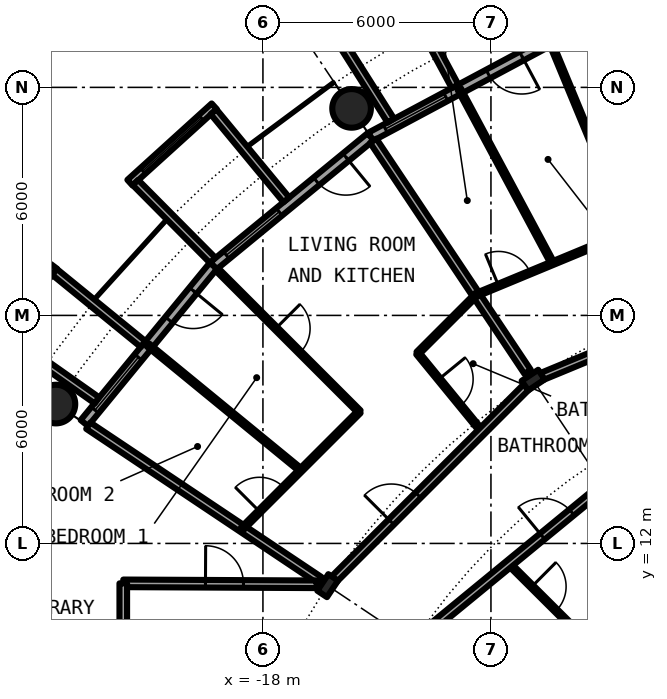
"""IFC4 building model, lengths in metres.
Left out: names, types, materials, properties, quantities, classifications, styles, units other than length and angle.
Written with IfcOpenShell. Run it as: python <this file> out.ifc"""

import sys

from ifc_helpers import new_model, si_unit, direction, frame, frame_2d, origin, origin_2d, place, context, subcontext, project, spatial, rectangle, circle, hollow_circle, i_section, extrude, element, fill, save


model = new_model("IFC4")
c1 = context("Model", 3, precision=1e-05, world=origin(), true_north=direction((0.0, 1.0)))
c2 = subcontext(c1, "Body", "Model", "MODEL_VIEW")
j1 = project(units=[si_unit("LENGTHUNIT", "METRE"), si_unit("PLANEANGLEUNIT", "RADIAN")], contexts=[c1])
p1 = place(None, origin())
s1 = spatial("IfcSite", under=j1, at=p1, CompositionType="ELEMENT")
p2 = place(p1, origin())
s2 = spatial("IfcBuilding", under=s1, at=p2, CompositionType="ELEMENT")
p3 = place(p2, frame((0.0, 0.0, 69.7)))
s3 = spatial("IfcBuildingStorey", under=s2, at=p3, CompositionType="ELEMENT", Elevation=69.7)
for number, where, z_axis, x_axis in (
    (1, (-15.667, 23.448, 0.0), (0.0, 0.0, 1.0), (1.0, 0.0, 0.0)),
    (2, (-23.448, 15.667, 0.0), (0.0, 0.0, 1.0), (1.0, 0.0, 0.0)),
):
    element("IfcColumn", number, at=place(p3, frame(where, z_axis=z_axis, x_axis=x_axis)), inside=s3, PredefinedType="COLUMN", context=c2, shape_type="SweptSolid", body=[
        extrude(hollow_circle(Radius=0.508, WallThickness=0.04, at=origin_2d()), origin(), (0.0, 0.0, 1.0), 3.05),
    ])
for number, where, z_axis, x_axis in (
    (3, (-10.889, 16.297, 0.0), (0.0, 0.0, 1.0), (-0.556, 0.831, 0.0)),
    (4, (-16.297, 10.889, 0.0), (0.0, 0.0, 1.0), (-0.831, 0.556, 0.0)),
):
    element("IfcColumn", number, at=place(p3, frame(where, z_axis=z_axis, x_axis=x_axis)), inside=s3, PredefinedType="COLUMN", context=c2, shape_type="SweptSolid", body=[
        extrude(i_section(OverallWidth=0.306, OverallDepth=0.524, WebThickness=0.021, FlangeThickness=0.04, FilletRadius=0.027, at=origin_2d()), origin(), (0.0, 0.0, 1.0), 3.05),
    ])
p4 = place(p3, frame((-10.447, 25.222, 0.0), z_axis=(0.0, 0.0, 1.0), x_axis=(-0.881915646801, -0.471407246368, 0.0)))
e5 = element("IfcWall", 5, at=p4, inside=s3, PredefinedType="SOLIDWALL", context=c2, shape_type="SweptSolid", body=[
    extrude(rectangle(XDim=5.352, YDim=0.25, at=frame_2d((2.676, 0.0))), origin(), (0.0, 0.0, 1.0), 2.7),
])
p5 = place(p4, frame((0.841, 0.0, 0.0)))
e6 = element("IfcOpeningElement", 6, at=p5, cuts=e5, PredefinedType="OPENING", context=c2, shape_type="SweptSolid", body=[
    extrude(rectangle(XDim=1.0, YDim=2.2, at=frame_2d((0.5, 1.1))), frame((0.0, 0.135, 0.0), z_axis=(0.0, -1.0, 0.0), x_axis=(1.0, 0.0, 0.0)), (0.0, 0.0, 1.0), 0.27),
])
p6 = place(p4, frame((3.111, 0.0, 0.3)))
e7 = element("IfcOpeningElement", 7, at=p6, cuts=e5, PredefinedType="OPENING", context=c2, shape_type="SweptSolid", body=[
    extrude(rectangle(XDim=1.8, YDim=2.1, at=frame_2d((0.9, 1.05))), frame((0.0, 0.135, 0.0), z_axis=(0.0, -1.0, 0.0), x_axis=(1.0, 0.0, 0.0)), (0.0, 0.0, 1.0), 0.27),
])
p7 = place(p3, frame((-12.945, 24.029, -0.03), z_axis=(0.0, 0.0, 1.0), x_axis=(-0.474424310775, 0.88029629861, 0.0)))
e8 = element("IfcWall", 8, at=p7, inside=s3, PredefinedType="SOLIDWALL", context=c2, shape_type="SweptSolid", body=[
    extrude(rectangle(XDim=3.006, YDim=0.2, at=frame_2d((1.503, 0.0))), origin(), (0.0, 0.0, 1.0), 2.73),
])
p8 = place(p3, frame((-14.635, 23.126, -0.03), z_axis=(0.0, 0.0, 1.0), x_axis=(-0.534437802731, 0.845207805816, 0.0)))
e9 = element("IfcWall", 9, at=p8, inside=s3, PredefinedType="SOLIDWALL", context=c2, shape_type="SweptSolid", body=[
    extrude(rectangle(XDim=2.932, YDim=0.2, at=frame_2d((1.466, 0.0))), origin(), (0.0, 0.0, 1.0), 2.73),
])
p9 = place(p3, frame((-15.167, 22.699, 0.0), z_axis=(0.0, 0.0, 1.0), x_axis=(-0.773019449054, -0.634382322723, 0.0)))
e10 = element("IfcWall", 10, at=p9, inside=s3, PredefinedType="SOLIDWALL", context=c2, shape_type="SweptSolid", body=[
    extrude(rectangle(XDim=5.352, YDim=0.25, at=frame_2d((2.676, 0.0))), origin(), (0.0, 0.0, 1.0), 2.7),
])
p10 = place(p9, frame((0.841, 0.0, 0.0)))
e11 = element("IfcOpeningElement", 11, at=p10, cuts=e10, PredefinedType="OPENING", context=c2, shape_type="SweptSolid", body=[
    extrude(rectangle(XDim=1.0, YDim=2.2, at=frame_2d((0.5, 1.1))), frame((0.0, 0.135, 0.0), z_axis=(0.0, -1.0, 0.0), x_axis=(1.0, 0.0, 0.0)), (0.0, 0.0, 1.0), 0.27),
])
p11 = place(p9, frame((3.111, 0.0, 0.3)))
e12 = element("IfcOpeningElement", 12, at=p11, cuts=e10, PredefinedType="OPENING", context=c2, shape_type="SweptSolid", body=[
    extrude(rectangle(XDim=1.8, YDim=2.1, at=frame_2d((0.9, 1.05))), frame((0.0, 0.135, 0.0), z_axis=(0.0, -1.0, 0.0), x_axis=(1.0, 0.0, 0.0)), (0.0, 0.0, 1.0), 0.27),
])
p12 = place(p3, frame((-19.282, 23.503, -0.03), z_axis=(0.0, 0.0, 1.0), x_axis=(-0.740998365753, -0.671506829416, 0.0)))
e13 = element("IfcWall", 13, at=p12, inside=s3, PredefinedType="SOLIDWALL", context=c2, shape_type="SweptSolid", body=[
    extrude(rectangle(XDim=2.993, YDim=0.2, at=frame_2d((1.497, 0.0))), origin(), (0.0, 0.0, 1.0), 2.73),
])
p13 = place(p12, frame((0.457, 0.0, 0.33)))
e14 = element("IfcOpeningElement", 14, at=p13, cuts=e13, PredefinedType="OPENING", context=c2, shape_type="SweptSolid", body=[
    extrude(circle(Radius=1.04, at=frame_2d((1.04, 1.04))), frame((0.0, 0.11, 0.0), z_axis=(0.0, -1.0, 0.0), x_axis=(1.0, 0.0, 0.0)), (0.0, 0.0, 1.0), 0.22),
])
p14 = place(p3, frame((-17.384, 21.041, -0.03), z_axis=(0.0, 0.0, 1.0), x_axis=(-0.63709551667, 0.770784861449, 0.0)))
e15 = element("IfcWall", 15, at=p14, inside=s3, PredefinedType="SOLIDWALL", context=c2, shape_type="SweptSolid", body=[
    extrude(rectangle(XDim=3.006, YDim=0.2, at=frame_2d((1.503, 0.0))), origin(), (0.0, 0.0, 1.0), 2.73),
])
p15 = place(p3, frame((-19.323, 19.45, -0.03), z_axis=(0.0, 0.0, 1.0), x_axis=(-0.704476739375, 0.709727076896, 0.0)))
e16 = element("IfcWall", 16, at=p15, inside=s3, PredefinedType="SOLIDWALL", context=c2, shape_type="SweptSolid", body=[
    extrude(rectangle(XDim=2.883, YDim=0.2, at=frame_2d((1.441, 0.0))), origin(), (0.0, 0.0, 1.0), 2.73),
])
p16 = place(p3, frame((-19.304, 19.304, 0.0), z_axis=(0.0, 0.0, 1.0), x_axis=(-0.634382322723, -0.773019449054, 0.0)))
e17 = element("IfcWall", 17, at=p16, inside=s3, PredefinedType="SOLIDWALL", context=c2, shape_type="SweptSolid", body=[
    extrude(rectangle(XDim=5.352, YDim=0.25, at=frame_2d((2.676, 0.0))), origin(), (0.0, 0.0, 1.0), 2.7),
])
p17 = place(p16, frame((0.841, 0.0, 0.0)))
e18 = element("IfcOpeningElement", 18, at=p17, cuts=e17, PredefinedType="OPENING", context=c2, shape_type="SweptSolid", body=[
    extrude(rectangle(XDim=1.0, YDim=2.2, at=frame_2d((0.5, 1.1))), frame((0.0, 0.135, 0.0), z_axis=(0.0, -1.0, 0.0), x_axis=(1.0, 0.0, 0.0)), (0.0, 0.0, 1.0), 0.27),
])
p18 = place(p16, frame((3.111, 0.0, 0.3)))
e19 = element("IfcOpeningElement", 19, at=p18, cuts=e17, PredefinedType="OPENING", context=c2, shape_type="SweptSolid", body=[
    extrude(rectangle(XDim=1.8, YDim=2.1, at=frame_2d((0.9, 1.05))), frame((0.0, 0.135, 0.0), z_axis=(0.0, -1.0, 0.0), x_axis=(1.0, 0.0, 0.0)), (0.0, 0.0, 1.0), 0.27),
])
p19 = place(p3, frame((-23.497, 19.289, -0.03), z_axis=(0.0, 0.0, 1.0), x_axis=(-0.60418752353, -0.796842165306, 0.0)))
e20 = element("IfcWall", 20, at=p19, inside=s3, PredefinedType="SOLIDWALL", context=c2, shape_type="SweptSolid", body=[
    extrude(rectangle(XDim=2.337, YDim=0.2, at=frame_2d((1.168, 0.0))), origin(), (0.0, 0.0, 1.0), 2.73),
])
p20 = place(p19, frame((0.128, 0.0, 0.33)))
e21 = element("IfcOpeningElement", 21, at=p20, cuts=e20, PredefinedType="OPENING", context=c2, shape_type="SweptSolid", body=[
    extrude(circle(Radius=1.04, at=frame_2d((1.04, 1.04))), frame((0.0, 0.11, 0.0), z_axis=(0.0, -1.0, 0.0), x_axis=(1.0, 0.0, 0.0)), (0.0, 0.0, 1.0), 0.22),
])
p21 = place(p3, frame((-21.155, 17.246, -0.03), z_axis=(0.0, 0.0, 1.0), x_axis=(-0.775179004516, 0.631741648902, 0.0)))
e22 = element("IfcWall", 22, at=p21, inside=s3, PredefinedType="SOLIDWALL", context=c2, shape_type="SweptSolid", body=[
    extrude(rectangle(XDim=3.006, YDim=0.2, at=frame_2d((1.503, 0.0))), origin(), (0.0, 0.0, 1.0), 2.73),
])
p22 = place(p3, frame((-22.37, 15.765, -0.03), z_axis=(0.0, 0.0, 1.0), x_axis=(-0.817256123454, 0.576274612209, 0.0)))
e23 = element("IfcWall", 23, at=p22, inside=s3, PredefinedType="SOLIDWALL", context=c2, shape_type="SweptSolid", body=[
    extrude(rectangle(XDim=2.933, YDim=0.2, at=frame_2d((1.466, 0.0))), origin(), (0.0, 0.0, 1.0), 2.73),
])
p23 = place(p3, frame((-22.595, 15.098, 0.0), z_axis=(0.0, 0.0, 1.0), x_axis=(0.831382022135, -0.555701298605, 0.0)))
e24 = element("IfcWall", 24, at=p23, inside=s3, PredefinedType="PARTITIONING", context=c2, shape_type="SweptSolid", body=[
    extrude(rectangle(XDim=7.313, YDim=0.2, at=frame_2d((3.657, 0.0))), origin(), (0.0, 0.0, 1.0), 2.7),
])
p24 = place(p3, frame((-21.023, 17.22, 0.0), z_axis=(0.0, 0.0, 1.0), x_axis=(0.773517471898, -0.633774976367, 0.0)))
e25 = element("IfcWall", 25, at=p24, inside=s3, PredefinedType="PARTITIONING", context=c2, shape_type="SweptSolid", body=[
    extrude(rectangle(XDim=5.196, YDim=0.1, at=frame_2d((2.598, 0.0))), origin(), (0.0, 0.0, 1.0), 2.7),
])
p25 = place(p3, frame((-19.216, 19.216, 0.0), z_axis=(0.0, 0.0, 1.0), x_axis=(0.707106781187, -0.707106781187, 0.0)))
e26 = element("IfcWall", 26, at=p25, inside=s3, PredefinedType="PARTITIONING", context=c2, shape_type="SweptSolid", body=[
    extrude(rectangle(XDim=5.305, YDim=0.1, at=frame_2d((2.652, 0.0))), origin(), (0.0, 0.0, 1.0), 2.7),
])
p26 = place(p25, frame((2.202, 0.0, 0.0)))
e27 = element("IfcOpeningElement", 27, at=p26, cuts=e26, PredefinedType="OPENING", context=c2, shape_type="SweptSolid", body=[
    extrude(rectangle(XDim=0.9, YDim=2.3, at=frame_2d((0.45, 1.15))), frame((0.0, 0.06, 0.0), z_axis=(0.0, -1.0, 0.0), x_axis=(1.0, 0.0, 0.0)), (0.0, 0.0, 1.0), 0.12),
])
p27 = place(p3, frame((-15.097, 22.595, 0.0), z_axis=(0.0, 0.0, 1.0), x_axis=(0.555516661303, -0.831505405283, 0.0)))
e28 = element("IfcWall", 28, at=p27, inside=s3, PredefinedType="PARTITIONING", context=c2, shape_type="SweptSolid", body=[
    extrude(rectangle(XDim=7.312, YDim=0.2, at=frame_2d((3.656, 0.0))), origin(), (0.0, 0.0, 1.0), 2.7),
])
p28 = place(p3, frame((-13.927, 17.004, 0.0), z_axis=(0.0, 0.0, 1.0), x_axis=(0.633582447834, -0.77367517848, 0.0)))
e29 = element("IfcWall", 29, at=p28, inside=s3, PredefinedType="PARTITIONING", context=c2, shape_type="SweptSolid", body=[
    extrude(rectangle(XDim=2.661, YDim=0.1, at=frame_2d((1.331, 0.0))), origin(), (0.0, 0.0, 1.0), 2.7),
])
p29 = place(p28, frame((0.881, 0.0, 0.0)))
e30 = element("IfcOpeningElement", 30, at=p29, cuts=e29, PredefinedType="OPENING", context=c2, shape_type="SweptSolid", body=[
    extrude(rectangle(XDim=0.9, YDim=2.3, at=frame_2d((0.45, 1.15))), frame((0.0, 0.06, 0.0), z_axis=(0.0, -1.0, 0.0), x_axis=(1.0, 0.0, 0.0)), (0.0, 0.0, 1.0), 0.12),
])
p30 = place(p3, frame((-12.833, 23.954, 0.0), z_axis=(0.0, 0.0, 1.0), x_axis=(0.472148388886, -0.881519085938, 0.0)))
e31 = element("IfcWall", 31, at=p30, inside=s3, PredefinedType="PARTITIONING", context=c2, shape_type="SweptSolid", body=[
    extrude(rectangle(XDim=5.196, YDim=0.1, at=frame_2d((2.598, 0.0))), origin(), (0.0, 0.0, 1.0), 2.7),
])
p31 = place(p3, frame((-11.524, 11.464, 0.0), z_axis=(0.0, 0.0, 1.0), x_axis=(0.708796844581, -0.705412668665, 0.0)))
e32 = element("IfcWall", 32, at=p31, inside=s3, PredefinedType="PARTITIONING", context=c2, shape_type="SweptSolid", body=[
    extrude(rectangle(XDim=2.597, YDim=0.1, at=frame_2d((1.299, 0.0))), origin(), (0.0, 0.0, 1.0), 2.7),
])
p32 = place(p31, frame((0.849, 0.0, 0.0)))
e33 = element("IfcOpeningElement", 33, at=p32, cuts=e32, PredefinedType="OPENING", context=c2, shape_type="SweptSolid", body=[
    extrude(rectangle(XDim=0.9, YDim=2.3, at=frame_2d((0.45, 1.15))), frame((0.0, 0.06, 0.0), z_axis=(0.0, -1.0, 0.0), x_axis=(1.0, 0.0, 0.0)), (0.0, 0.0, 1.0), 0.12),
])
p33 = place(p3, frame((-10.399, 25.106, 0.0), z_axis=(0.0, 0.0, 1.0), x_axis=(0.382620183578, -0.92390572848, 0.0)))
e34 = element("IfcWall", 34, at=p33, inside=s3, PredefinedType="PARTITIONING", context=c2, shape_type="SweptSolid", body=[
    extrude(rectangle(XDim=5.302, YDim=0.1, at=frame_2d((2.651, 0.0))), origin(), (0.0, 0.0, 1.0), 2.7),
])
p34 = place(p33, frame((2.201, 0.0, 0.0)))
e35 = element("IfcOpeningElement", 35, at=p34, cuts=e34, PredefinedType="OPENING", context=c2, shape_type="SweptSolid", body=[
    extrude(rectangle(XDim=0.9, YDim=2.3, at=frame_2d((0.45, 1.15))), frame((0.0, 0.06, 0.0), z_axis=(0.0, -1.0, 0.0), x_axis=(1.0, 0.0, 0.0)), (0.0, 0.0, 1.0), 0.12),
])
p35 = place(p3, frame((-21.675, 10.95, 0.0), z_axis=(0.0, 0.0, 1.0), x_axis=(0.999988019025, -0.004895079807, 0.0)))
e36 = element("IfcWall", 36, at=p35, inside=s3, PredefinedType="PARTITIONING", context=c2, shape_type="SweptSolid", body=[
    extrude(rectangle(XDim=5.087, YDim=0.2, at=frame_2d((2.543, 0.0))), origin(), (0.0, 0.0, 1.0), 2.7),
])
p36 = place(p35, frame((2.163, 0.0, 0.0)))
e37 = element("IfcOpeningElement", 37, at=p36, cuts=e36, PredefinedType="OPENING", context=c2, shape_type="SweptSolid", body=[
    extrude(rectangle(XDim=1.0, YDim=2.3, at=frame_2d((0.5, 1.15))), frame((0.0, 0.11, 0.0), z_axis=(0.0, -1.0, 0.0), x_axis=(1.0, 0.0, 0.0)), (0.0, 0.0, 1.0), 0.22),
])
p37 = place(p3, frame((-10.087, 9.3, 0.0), z_axis=(0.0, 0.0, 1.0), x_axis=(0.772957368531, 0.6344579627, 0.0)))
e38 = element("IfcWall", 38, at=p37, inside=s3, PredefinedType="PARTITIONING", context=c2, shape_type="SweptSolid", body=[
    extrude(rectangle(XDim=1.906, YDim=0.1, at=frame_2d((0.953, 0.0))), origin(), (0.0, 0.0, 1.0), 2.7),
])
p38 = place(p3, frame((-14.052, 9.389, 0.0), z_axis=(0.0, 0.0, 1.0), x_axis=(0.77292501819, 0.634497372931, 0.0)))
e39 = element("IfcWall", 39, at=p38, inside=s3, PredefinedType="PARTITIONING", context=c2, shape_type="SweptSolid", body=[
    extrude(rectangle(XDim=9.81, YDim=0.2, at=frame_2d((4.905, 0.0))), origin(), (0.0, 0.0, 1.0), 2.7),
])
p39 = place(p38, frame((4.406, 0.0, 0.0)))
e40 = element("IfcOpeningElement", 40, at=p39, cuts=e39, PredefinedType="OPENING", context=c2, shape_type="SweptSolid", body=[
    extrude(rectangle(XDim=1.0, YDim=2.3, at=frame_2d((0.5, 1.15))), frame((0.0, 0.11, 0.0), z_axis=(0.0, -1.0, 0.0), x_axis=(1.0, 0.0, 0.0)), (0.0, 0.0, 1.0), 0.22),
])
p40 = place(p3, frame((-16.186, 11.0, 0.0), z_axis=(0.0, 0.0, 1.0), x_axis=(0.707106781187, 0.707106781187, 0.0)))
e41 = element("IfcWall", 41, at=p40, inside=s3, PredefinedType="PARTITIONING", context=c2, shape_type="SweptSolid", body=[
    extrude(rectangle(XDim=7.334, YDim=0.2, at=frame_2d((3.667, 0.0))), origin(), (0.0, 0.0, 1.0), 2.38),
])
p41 = place(p40, frame((2.211, 0.0, 0.0)))
e42 = element("IfcOpeningElement", 42, at=p41, cuts=e41, PredefinedType="OPENING", context=c2, shape_type="SweptSolid", body=[
    extrude(rectangle(XDim=1.0, YDim=2.3, at=frame_2d((0.5, 1.15))), frame((0.0, 0.11, 0.0), z_axis=(0.0, -1.0, 0.0), x_axis=(1.0, 0.0, 0.0)), (0.0, 0.0, 1.0), 0.22),
])
p42 = place(p3, frame((-10.745, 16.357, 0.0), z_axis=(0.0, 0.0, 1.0), x_axis=(0.923928411035, 0.382565407848, 0.0)))
e43 = element("IfcWall", 43, at=p42, inside=s3, PredefinedType="PARTITIONING", context=c2, shape_type="SweptSolid", body=[
    extrude(rectangle(XDim=7.335, YDim=0.2, at=frame_2d((3.667, 0.0))), origin(), (0.0, 0.0, 1.0), 2.38),
])
p43 = place(p42, frame((2.212, 0.0, 0.0)))
e44 = element("IfcOpeningElement", 44, at=p43, cuts=e43, PredefinedType="OPENING", context=c2, shape_type="SweptSolid", body=[
    extrude(rectangle(XDim=1.0, YDim=2.3, at=frame_2d((0.5, 1.15))), frame((0.0, 0.11, 0.0), z_axis=(0.0, -1.0, 0.0), x_axis=(1.0, 0.0, 0.0)), (0.0, 0.0, 1.0), 0.22),
])
p44 = place(p3, frame((-21.675, 9.3, 0.0), z_axis=(0.0, 0.0, 1.0), x_axis=(0.0, 1.0, 0.0)))
e45 = element("IfcWall", 45, at=p44, inside=s3, PredefinedType="PARTITIONING", context=c2, shape_type="SweptSolid", body=[
    extrude(rectangle(XDim=1.65, YDim=0.2, at=frame_2d((0.825, 0.0))), origin(), (0.0, 0.0, 1.0), 2.7),
])
p45 = place(p3, frame((-18.542, 12.389, 0.0), z_axis=(0.0, 0.0, 1.0), x_axis=(0.707190945535, 0.707022606819, 0.0)))
e46 = element("IfcWall", 46, at=p45, inside=s3, PredefinedType="PARTITIONING", context=c2, shape_type="SweptSolid", body=[
    extrude(rectangle(XDim=4.351, YDim=0.1, at=frame_2d((2.175, 0.0))), origin(), (0.0, 0.0, 1.0), 2.7),
])
p46 = place(p45, frame((0.639, 0.0, 0.0)))
e47 = element("IfcOpeningElement", 47, at=p46, cuts=e46, PredefinedType="OPENING", context=c2, shape_type="SweptSolid", body=[
    extrude(rectangle(XDim=0.9, YDim=2.3, at=frame_2d((0.45, 1.15))), frame((0.0, 0.06, 0.0), z_axis=(0.0, -1.0, 0.0), x_axis=(1.0, 0.0, 0.0)), (0.0, 0.0, 1.0), 0.12),
])
p47 = place(p3, frame((-13.924, 17.006, 0.0), z_axis=(0.0, 0.0, 1.0), x_axis=(0.707387256653, 0.706826194425, 0.0)))
e48 = element("IfcWall", 48, at=p47, inside=s3, PredefinedType="PARTITIONING", context=c2, shape_type="SweptSolid", body=[
    extrude(rectangle(XDim=2.176, YDim=0.1, at=frame_2d((1.088, 0.0))), origin(), (0.0, 0.0, 1.0), 2.7),
])
p48 = place(p3, frame((-12.397, 18.536, 0.0), z_axis=(0.0, 0.0, 1.0), x_axis=(0.923761942059, 0.382967197554, 0.0)))
e49 = element("IfcWall", 49, at=p48, inside=s3, PredefinedType="PARTITIONING", context=c2, shape_type="SweptSolid", body=[
    extrude(rectangle(XDim=4.356, YDim=0.1, at=frame_2d((2.178, 0.0))), origin(), (0.0, 0.0, 1.0), 2.7),
])
p49 = place(p48, frame((0.646, 0.0, 0.0)))
e50 = element("IfcOpeningElement", 50, at=p49, cuts=e49, PredefinedType="OPENING", context=c2, shape_type="SweptSolid", body=[
    extrude(rectangle(XDim=0.9, YDim=2.3, at=frame_2d((0.45, 1.15))), frame((0.0, 0.06, 0.0), z_axis=(0.0, -1.0, 0.0), x_axis=(1.0, 0.0, 0.0)), (0.0, 0.0, 1.0), 0.12),
])
p50 = place(p5, origin())
e51 = element("IfcDoor", 51, at=p50, inside=s3, OperationType="SINGLE_SWING_LEFT", PredefinedType="DOOR", context=c2, shape_type="SweptSolid", body=[
    extrude(rectangle(XDim=1.0, YDim=2.2, at=frame_2d((0.5, 1.1))), frame((0.0, 0.025, 0.0), z_axis=(0.0, -1.0, 0.0), x_axis=(1.0, 0.0, 0.0)), (0.0, 0.0, 1.0), 0.05),
])
fill(e6, e51)
p51 = place(p6, origin())
e52 = element("IfcWindow", 52, at=p51, inside=s3, PartitioningType="SINGLE_PANEL", PredefinedType="WINDOW", context=c2, shape_type="SweptSolid", body=[
    extrude(rectangle(XDim=1.8, YDim=2.1, at=frame_2d((0.9, 1.05))), frame((0.0, 0.03, 0.0), z_axis=(0.0, -1.0, 0.0), x_axis=(1.0, 0.0, 0.0)), (0.0, 0.0, 1.0), 0.06),
])
fill(e7, e52)
p52 = place(p10, origin())
e53 = element("IfcDoor", 53, at=p52, inside=s3, OperationType="SINGLE_SWING_LEFT", PredefinedType="DOOR", context=c2, shape_type="SweptSolid", body=[
    extrude(rectangle(XDim=1.0, YDim=2.2, at=frame_2d((0.5, 1.1))), frame((0.0, 0.025, 0.0), z_axis=(0.0, -1.0, 0.0), x_axis=(1.0, 0.0, 0.0)), (0.0, 0.0, 1.0), 0.05),
])
fill(e11, e53)
p53 = place(p11, origin())
e54 = element("IfcWindow", 54, at=p53, inside=s3, PartitioningType="SINGLE_PANEL", PredefinedType="WINDOW", context=c2, shape_type="SweptSolid", body=[
    extrude(rectangle(XDim=1.8, YDim=2.1, at=frame_2d((0.9, 1.05))), frame((0.0, 0.03, 0.0), z_axis=(0.0, -1.0, 0.0), x_axis=(1.0, 0.0, 0.0)), (0.0, 0.0, 1.0), 0.06),
])
fill(e12, e54)
p54 = place(p13, origin())
e55 = element("IfcWindow", 55, at=p54, inside=s3, PartitioningType="SINGLE_PANEL", PredefinedType="WINDOW", context=c2, shape_type="SweptSolid", body=[
    extrude(circle(Radius=1.04, at=frame_2d((1.04, 1.04))), frame((0.0, 0.03, 0.0), z_axis=(0.0, -1.0, 0.0), x_axis=(1.0, 0.0, 0.0)), (0.0, 0.0, 1.0), 0.06),
])
fill(e14, e55)
p55 = place(p17, origin())
e56 = element("IfcDoor", 56, at=p55, inside=s3, OperationType="SINGLE_SWING_LEFT", PredefinedType="DOOR", context=c2, shape_type="SweptSolid", body=[
    extrude(rectangle(XDim=1.0, YDim=2.2, at=frame_2d((0.5, 1.1))), frame((0.0, 0.025, 0.0), z_axis=(0.0, -1.0, 0.0), x_axis=(1.0, 0.0, 0.0)), (0.0, 0.0, 1.0), 0.05),
])
fill(e18, e56)
p56 = place(p18, origin())
e57 = element("IfcWindow", 57, at=p56, inside=s3, PartitioningType="SINGLE_PANEL", PredefinedType="WINDOW", context=c2, shape_type="SweptSolid", body=[
    extrude(rectangle(XDim=1.8, YDim=2.1, at=frame_2d((0.9, 1.05))), frame((0.0, 0.03, 0.0), z_axis=(0.0, -1.0, 0.0), x_axis=(1.0, 0.0, 0.0)), (0.0, 0.0, 1.0), 0.06),
])
fill(e19, e57)
p57 = place(p34, origin())
e58 = element("IfcDoor", 58, at=p57, inside=s3, OperationType="SINGLE_SWING_LEFT", PredefinedType="DOOR", context=c2, shape_type="SweptSolid", body=[
    extrude(rectangle(XDim=0.9, YDim=2.3, at=frame_2d((0.45, 1.15))), frame((0.0, 0.025, 0.0), z_axis=(0.0, -1.0, 0.0), x_axis=(1.0, 0.0, 0.0)), (0.0, 0.0, 1.0), 0.05),
])
fill(e35, e58)
p58 = place(p49, origin())
e59 = element("IfcDoor", 59, at=p58, inside=s3, OperationType="SINGLE_SWING_LEFT", PredefinedType="DOOR", context=c2, shape_type="SweptSolid", body=[
    extrude(rectangle(XDim=0.9, YDim=2.3, at=frame_2d((0.45, 1.15))), frame((0.0, 0.025, 0.0), z_axis=(0.0, -1.0, 0.0), x_axis=(1.0, 0.0, 0.0)), (0.0, 0.0, 1.0), 0.05),
])
fill(e50, e59)
p59 = place(p41, origin())
e60 = element("IfcDoor", 60, at=p59, inside=s3, OperationType="SINGLE_SWING_LEFT", PredefinedType="DOOR", context=c2, shape_type="SweptSolid", body=[
    extrude(rectangle(XDim=1.0, YDim=2.3, at=frame_2d((0.5, 1.15))), frame((0.0, 0.025, 0.0), z_axis=(0.0, -1.0, 0.0), x_axis=(1.0, 0.0, 0.0)), (0.0, 0.0, 1.0), 0.05),
])
fill(e42, e60)
p60 = place(p29, origin())
e61 = element("IfcDoor", 61, at=p60, inside=s3, OperationType="SINGLE_SWING_RIGHT", PredefinedType="DOOR", context=c2, shape_type="SweptSolid", body=[
    extrude(rectangle(XDim=0.9, YDim=2.3, at=frame_2d((0.45, 1.15))), frame((0.0, 0.025, 0.0), z_axis=(0.0, -1.0, 0.0), x_axis=(1.0, 0.0, 0.0)), (0.0, 0.0, 1.0), 0.05),
])
fill(e30, e61)
p61 = place(p26, origin())
e62 = element("IfcDoor", 62, at=p61, inside=s3, OperationType="SINGLE_SWING_LEFT", PredefinedType="DOOR", context=c2, shape_type="SweptSolid", body=[
    extrude(rectangle(XDim=0.9, YDim=2.3, at=frame_2d((0.45, 1.15))), frame((0.0, 0.025, 0.0), z_axis=(0.0, -1.0, 0.0), x_axis=(1.0, 0.0, 0.0)), (0.0, 0.0, 1.0), 0.05),
])
fill(e27, e62)
p62 = place(p46, origin())
e63 = element("IfcDoor", 63, at=p62, inside=s3, OperationType="SINGLE_SWING_LEFT", PredefinedType="DOOR", context=c2, shape_type="SweptSolid", body=[
    extrude(rectangle(XDim=0.9, YDim=2.3, at=frame_2d((0.45, 1.15))), frame((0.0, 0.025, 0.0), z_axis=(0.0, -1.0, 0.0), x_axis=(1.0, 0.0, 0.0)), (0.0, 0.0, 1.0), 0.05),
])
fill(e47, e63)
p63 = place(p39, origin())
e64 = element("IfcDoor", 64, at=p63, inside=s3, OperationType="SINGLE_SWING_RIGHT", PredefinedType="DOOR", context=c2, shape_type="SweptSolid", body=[
    extrude(rectangle(XDim=1.0, YDim=2.3, at=frame_2d((0.5, 1.15))), frame((0.0, 0.025, 0.0), z_axis=(0.0, -1.0, 0.0), x_axis=(1.0, 0.0, 0.0)), (0.0, 0.0, 1.0), 0.05),
])
fill(e40, e64)
p64 = place(p32, origin())
e65 = element("IfcDoor", 65, at=p64, inside=s3, OperationType="SINGLE_SWING_RIGHT", PredefinedType="DOOR", context=c2, shape_type="SweptSolid", body=[
    extrude(rectangle(XDim=0.9, YDim=2.3, at=frame_2d((0.45, 1.15))), frame((0.0, 0.025, 0.0), z_axis=(0.0, -1.0, 0.0), x_axis=(1.0, 0.0, 0.0)), (0.0, 0.0, 1.0), 0.05),
])
fill(e33, e65)
p65 = place(p36, origin())
e66 = element("IfcDoor", 66, at=p65, inside=s3, OperationType="SINGLE_SWING_RIGHT", PredefinedType="DOOR", context=c2, shape_type="SweptSolid", body=[
    extrude(rectangle(XDim=1.0, YDim=2.3, at=frame_2d((0.5, 1.15))), frame((0.0, 0.025, 0.0), z_axis=(0.0, -1.0, 0.0), x_axis=(1.0, 0.0, 0.0)), (0.0, 0.0, 1.0), 0.05),
])
fill(e37, e66)
save(model, sys.argv[1])
